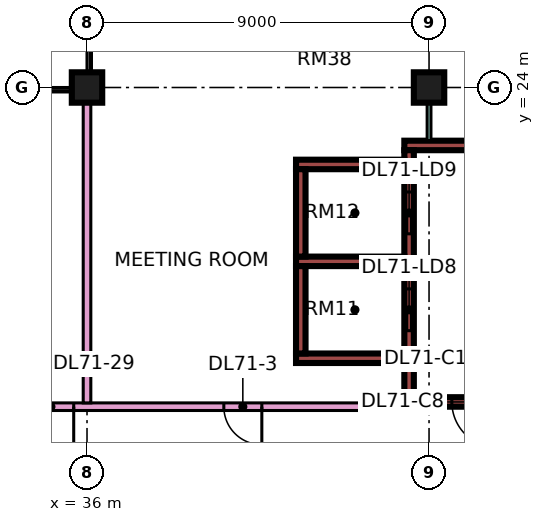
"""IFC4 building model, lengths in metres.
Left out: names, types, materials, properties, quantities, classifications, styles, units other than length and angle.
Written with IfcOpenShell. Run it as: python <this file> out.ifc"""

import sys

from ifc_helpers import new_model, si_unit, direction, frame, frame_2d, origin, origin_2d, place, context, subcontext, project, spatial, rectangle, extrude, element, fill, save


model = new_model("IFC4")
c1 = context("Model", 3, precision=1e-05, world=origin(), true_north=direction((0.0, 1.0)))
c2 = subcontext(c1, "Body", "Model", "MODEL_VIEW")
j1 = project(units=[si_unit("LENGTHUNIT", "METRE"), si_unit("PLANEANGLEUNIT", "RADIAN")], contexts=[c1])
p1 = place(None, origin())
s1 = spatial("IfcSite", under=j1, at=p1, CompositionType="ELEMENT")
p2 = place(p1, origin())
s2 = spatial("IfcBuilding", under=s1, at=p2, CompositionType="ELEMENT")
p3 = place(p2, frame((0.0, 0.0, 303.4)))
s3 = spatial("IfcBuildingStorey", under=s2, at=p3, CompositionType="ELEMENT", Elevation=303.4)
for number, where, z_axis, x_axis in (
    (1, (36.0, 24.0, 0.0), (0.0, 0.0, 1.0), (1.0, 0.0, 0.0)),
    (2, (45.0, 24.0, 0.0), (0.0, 0.0, 1.0), (1.0, 0.0, 0.0)),
):
    element("IfcColumn", number, at=place(p3, frame(where, z_axis=z_axis, x_axis=x_axis)), inside=s3, PredefinedType="COLUMN", context=c2, shape_type="SweptSolid", body=[
        extrude(rectangle(XDim=0.8, YDim=0.8, at=origin_2d()), origin(), (0.0, 0.0, 1.0), 3.75),
    ])
p4 = place(p3, frame((44.35, 15.725, 0.0), z_axis=(0.0, 0.0, 1.0), x_axis=(1.0, 0.0, 0.0)))
e3 = element("IfcWall", 3, at=p4, inside=s3, PredefinedType="SHEAR", context=c2, shape_type="SweptSolid", body=[
    extrude(rectangle(XDim=3.425, YDim=0.25, at=frame_2d((1.712, 0.0))), origin(), (0.0, 0.0, 1.0), 3.75),
])
p5 = place(p4, frame((1.25, 0.0, 0.0)))
e4 = element("IfcOpeningElement", 4, at=p5, cuts=e3, PredefinedType="OPENING", context=c2, shape_type="SweptSolid", body=[
    extrude(rectangle(XDim=1.2, YDim=2.2, at=frame_2d((0.6, 1.1))), frame((0.0, 0.135, 0.0), z_axis=(0.0, -1.0, 0.0), x_axis=(1.0, 0.0, 0.0)), (0.0, 0.0, 1.0), 0.27),
])
p6 = place(p3, frame((44.35, 22.475, 0.0), z_axis=(0.0, 0.0, 1.0), x_axis=(1.0, 0.0, 0.0)))
e5 = element("IfcWall", 5, at=p6, inside=s3, PredefinedType="SHEAR", context=c2, shape_type="SweptSolid", body=[
    extrude(rectangle(XDim=3.425, YDim=0.25, at=frame_2d((1.712, 0.0))), origin(), (0.0, 0.0, 1.0), 3.75),
])
p7 = place(p3, frame((44.475, 15.85, 0.0), z_axis=(0.0, 0.0, 1.0), x_axis=(0.0, 1.0, 0.0)))
e6 = element("IfcWall", 6, at=p7, inside=s3, PredefinedType="SHEAR", context=c2, shape_type="SweptSolid", body=[
    extrude(rectangle(XDim=6.5, YDim=0.25, at=frame_2d((3.25, 0.0))), origin(), (0.0, 0.0, 1.0), 3.75),
])
p8 = place(p7, frame((1.75, 0.0, 0.0)))
e7 = element("IfcOpeningElement", 7, at=p8, cuts=e6, PredefinedType="OPENING", context=c2, shape_type="SweptSolid", body=[
    extrude(rectangle(XDim=1.1, YDim=2.2, at=frame_2d((0.55, 1.1))), frame((0.0, 0.135, 0.0), z_axis=(0.0, -1.0, 0.0), x_axis=(1.0, 0.0, 0.0)), (0.0, 0.0, 1.0), 0.27),
])
p9 = place(p7, frame((4.3, 0.0, 0.0)))
e8 = element("IfcOpeningElement", 8, at=p9, cuts=e6, PredefinedType="OPENING", context=c2, shape_type="SweptSolid", body=[
    extrude(rectangle(XDim=1.1, YDim=2.2, at=frame_2d((0.55, 1.1))), frame((0.0, 0.135, 0.0), z_axis=(0.0, -1.0, 0.0), x_axis=(1.0, 0.0, 0.0)), (0.0, 0.0, 1.0), 0.27),
])
for number, where, z_axis, x_axis in (
    (9, (41.5, 16.875, 0.0), (0.0, 0.0, 1.0), (1.0, 0.0, 0.0)),
    (10, (41.5, 19.425, 0.0), (0.0, 0.0, 1.0), (1.0, 0.0, 0.0)),
    (11, (41.5, 21.975, 0.0), (0.0, 0.0, 1.0), (1.0, 0.0, 0.0)),
):
    element("IfcWall", number, at=place(p3, frame(where, z_axis=z_axis, x_axis=x_axis)), inside=s3, PredefinedType="SHEAR", context=c2, shape_type="SweptSolid", body=[
        extrude(rectangle(XDim=2.85, YDim=0.25, at=frame_2d((1.425, 0.0))), origin(), (0.0, 0.0, 1.0), 3.75),
    ])
for number, where, z_axis, x_axis in (
    (12, (41.625, 17.0, 0.0), (0.0, 0.0, 1.0), (0.0, 1.0, 0.0)),
    (13, (41.625, 19.55, 0.0), (0.0, 0.0, 1.0), (0.0, 1.0, 0.0)),
):
    element("IfcWall", number, at=place(p3, frame(where, z_axis=z_axis, x_axis=x_axis)), inside=s3, PredefinedType="SHEAR", context=c2, shape_type="SweptSolid", body=[
        extrude(rectangle(XDim=2.3, YDim=0.25, at=frame_2d((1.15, 0.0))), origin(), (0.0, 0.0, 1.0), 3.75),
    ])
p10 = place(p3, frame((34.0, 15.6, 0.0), z_axis=(0.0, 0.0, 1.0), x_axis=(1.0, 0.0, 0.0)))
e14 = element("IfcWall", 14, at=p10, inside=s3, PredefinedType="PARTITIONING", context=c2, shape_type="SweptSolid", body=[
    extrude(rectangle(XDim=10.35, YDim=0.2, at=frame_2d((5.175, 0.0))), origin(), (0.0, 0.0, 1.0), 3.35),
])
p11 = place(p10, frame((5.6, 0.0, 0.0)))
e15 = element("IfcOpeningElement", 15, at=p11, cuts=e14, PredefinedType="OPENING", context=c2, shape_type="SweptSolid", body=[
    extrude(rectangle(XDim=1.0, YDim=2.1, at=frame_2d((0.5, 1.05))), frame((0.0, 0.11, 0.0), z_axis=(0.0, -1.0, 0.0), x_axis=(1.0, 0.0, 0.0)), (0.0, 0.0, 1.0), 0.22),
])
p12 = place(p10, frame((0.45, 0.0, 0.0)))
e16 = element("IfcOpeningElement", 16, at=p12, cuts=e14, PredefinedType="OPENING", context=c2, shape_type="SweptSolid", body=[
    extrude(rectangle(XDim=1.2, YDim=2.1, at=frame_2d((0.6, 1.05))), frame((0.0, 0.11, 0.0), z_axis=(0.0, -1.0, 0.0), x_axis=(1.0, 0.0, 0.0)), (0.0, 0.0, 1.0), 0.22),
])
p13 = place(p3, frame((36.0, 15.7, 0.0), z_axis=(0.0, 0.0, 1.0), x_axis=(0.0, 1.0, 0.0)))
e17 = element("IfcWall", 17, at=p13, inside=s3, PredefinedType="PARTITIONING", context=c2, shape_type="SweptSolid", body=[
    extrude(rectangle(XDim=8.3, YDim=0.2, at=frame_2d((4.15, 0.0))), origin(), (0.0, 0.0, 1.0), 3.35),
])
p14 = place(p3, frame((45.0, 22.6, 0.0), z_axis=(0.0, 0.0, 1.0), x_axis=(0.0, 1.0, 0.0)))
e18 = element("IfcWall", 18, at=p14, inside=s3, PredefinedType="PARTITIONING", context=c2, shape_type="SweptSolid", body=[
    extrude(rectangle(XDim=1.4, YDim=0.1, at=frame_2d((0.7, 0.0))), origin(), (0.0, 0.0, 1.0), 3.35),
])
p15 = place(p5, origin())
e19 = element("IfcDoor", 19, at=p15, inside=s3, OperationType="SINGLE_SWING_RIGHT", PredefinedType="DOOR", context=c2, shape_type="SweptSolid", body=[
    extrude(rectangle(XDim=1.2, YDim=2.2, at=frame_2d((0.6, 1.1))), frame((0.0, 0.025, 0.0), z_axis=(0.0, -1.0, 0.0), x_axis=(1.0, 0.0, 0.0)), (0.0, 0.0, 1.0), 0.05),
])
fill(e4, e19)
p16 = place(p8, origin())
e20 = element("IfcDoor", 20, at=p16, inside=s3, OperationType="DOUBLE_DOOR_SLIDING", PredefinedType="DOOR", context=c2, shape_type="SweptSolid", body=[
    extrude(rectangle(XDim=1.1, YDim=2.2, at=frame_2d((0.55, 1.1))), frame((0.0, 0.025, 0.0), z_axis=(0.0, -1.0, 0.0), x_axis=(1.0, 0.0, 0.0)), (0.0, 0.0, 1.0), 0.05),
])
fill(e7, e20)
p17 = place(p9, origin())
e21 = element("IfcDoor", 21, at=p17, inside=s3, OperationType="DOUBLE_DOOR_SLIDING", PredefinedType="DOOR", context=c2, shape_type="SweptSolid", body=[
    extrude(rectangle(XDim=1.1, YDim=2.2, at=frame_2d((0.55, 1.1))), frame((0.0, 0.025, 0.0), z_axis=(0.0, -1.0, 0.0), x_axis=(1.0, 0.0, 0.0)), (0.0, 0.0, 1.0), 0.05),
])
fill(e8, e21)
p18 = place(p11, origin())
e22 = element("IfcDoor", 22, at=p18, inside=s3, OperationType="SINGLE_SWING_RIGHT", PredefinedType="DOOR", context=c2, shape_type="SweptSolid", body=[
    extrude(rectangle(XDim=1.0, YDim=2.1, at=frame_2d((0.5, 1.05))), frame((0.0, 0.025, 0.0), z_axis=(0.0, -1.0, 0.0), x_axis=(1.0, 0.0, 0.0)), (0.0, 0.0, 1.0), 0.05),
])
fill(e15, e22)
p19 = place(p12, origin())
e23 = element("IfcDoor", 23, at=p19, inside=s3, OperationType="SINGLE_SWING_RIGHT", PredefinedType="DOOR", context=c2, shape_type="SweptSolid", body=[
    extrude(rectangle(XDim=1.2, YDim=2.1, at=frame_2d((0.6, 1.05))), frame((0.0, 0.025, 0.0), z_axis=(0.0, -1.0, 0.0), x_axis=(1.0, 0.0, 0.0)), (0.0, 0.0, 1.0), 0.05),
])
fill(e16, e23)
save(model, sys.argv[1])
